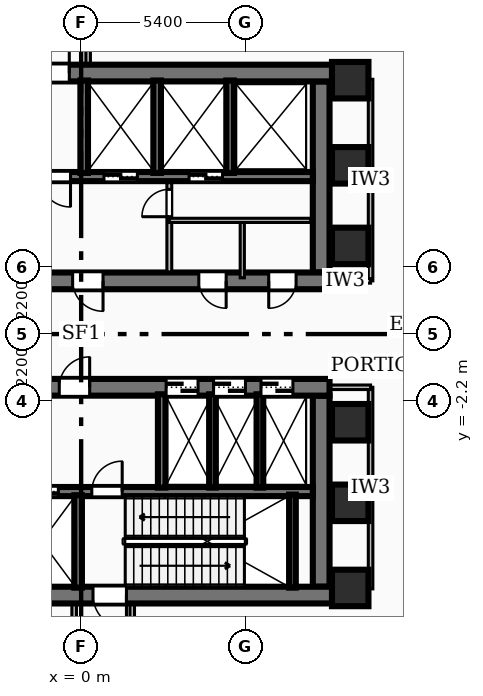
"""IFC4 building model, lengths in metres.
Left out: names, types, materials, properties, quantities, classifications, styles, units other than length and angle.
Written with IfcOpenShell. Run it as: python <this file> out.ifc"""

import sys

from ifc_helpers import new_model, si_unit, direction, frame, frame_2d, origin, origin_2d, place, context, subcontext, project, spatial, rectangle, extrude, element, fill, save


model = new_model("IFC4")
c1 = context("Model", 3, precision=1e-05, world=origin(), true_north=direction((0.0, 1.0)))
c2 = subcontext(c1, "Body", "Model", "MODEL_VIEW")
j1 = project(units=[si_unit("LENGTHUNIT", "METRE"), si_unit("PLANEANGLEUNIT", "RADIAN")], contexts=[c1])
p1 = place(None, origin())
s1 = spatial("IfcSite", under=j1, at=p1, CompositionType="ELEMENT")
p2 = place(p1, origin())
s2 = spatial("IfcBuilding", under=s1, at=p2, CompositionType="ELEMENT")
p3 = place(p2, origin())
s3 = spatial("IfcBuildingStorey", under=s2, at=p3, CompositionType="ELEMENT", Elevation=0.0)
p4 = place(p3, frame((-8.78, 8.585, 0.0), z_axis=(0.0, 0.0, 1.0), x_axis=(1.0, 0.0, 0.0)))
e1 = element("IfcWall", 1, at=p4, inside=s3, PredefinedType="SHEAR", context=c2, shape_type="SweptSolid", body=[
    extrude(rectangle(XDim=17.56, YDim=0.55, at=frame_2d((8.78, 0.0))), origin(), (0.0, 0.0, 1.0), 5.08),
])
p5 = place(p4, frame((7.29, 0.0, 0.0)))
e2 = element("IfcOpeningElement", 2, at=p5, cuts=e1, PredefinedType="OPENING", context=c2, shape_type="SweptSolid", body=[
    extrude(rectangle(XDim=1.1, YDim=2.15, at=frame_2d((0.55, 1.075))), frame((0.0, 0.285, 0.0), z_axis=(0.0, -1.0, 0.0), x_axis=(1.0, 0.0, 0.0)), (0.0, 0.0, 1.0), 0.57),
])
p6 = place(p3, frame((8.17, 1.75, 0.0), z_axis=(0.0, 0.0, 1.0), x_axis=(-1.0, 0.0, 0.0)))
e3 = element("IfcWall", 3, at=p6, inside=s3, PredefinedType="SHEAR", context=c2, shape_type="SweptSolid", body=[
    extrude(rectangle(XDim=16.34, YDim=0.55, at=frame_2d((8.17, 0.0))), origin(), (0.0, 0.0, 1.0), 5.08),
])
p7 = place(p6, frame((7.45, 0.0, 0.0)))
e4 = element("IfcOpeningElement", 4, at=p7, cuts=e3, PredefinedType="OPENING", context=c2, shape_type="SweptSolid", body=[
    extrude(rectangle(XDim=1.0, YDim=2.1, at=frame_2d((0.5, 1.05))), frame((0.0, 0.285, 0.0), z_axis=(0.0, -1.0, 0.0), x_axis=(1.0, 0.0, 0.0)), (0.0, 0.0, 1.0), 0.57),
])
p8 = place(p6, frame((14.285, 0.0, 0.0)))
e5 = element("IfcOpeningElement", 5, at=p8, cuts=e3, PredefinedType="OPENING", context=c2, shape_type="SweptSolid", body=[
    extrude(rectangle(XDim=1.05, YDim=2.15, at=frame_2d((0.525, 1.075))), frame((0.0, 0.285, 0.0), z_axis=(0.0, -1.0, 0.0), x_axis=(1.0, 0.0, 0.0)), (0.0, 0.0, 1.0), 0.57),
])
p9 = place(p6, frame((12.725, 0.0, 0.0)))
e6 = element("IfcOpeningElement", 6, at=p9, cuts=e3, PredefinedType="OPENING", context=c2, shape_type="SweptSolid", body=[
    extrude(rectangle(XDim=1.05, YDim=2.15, at=frame_2d((0.525, 1.075))), frame((0.0, 0.285, 0.0), z_axis=(0.0, -1.0, 0.0), x_axis=(1.0, 0.0, 0.0)), (0.0, 0.0, 1.0), 0.57),
])
p10 = place(p6, frame((11.165, 0.0, 0.0)))
e7 = element("IfcOpeningElement", 7, at=p10, cuts=e3, PredefinedType="OPENING", context=c2, shape_type="SweptSolid", body=[
    extrude(rectangle(XDim=1.05, YDim=2.15, at=frame_2d((0.525, 1.075))), frame((0.0, 0.285, 0.0), z_axis=(0.0, -1.0, 0.0), x_axis=(1.0, 0.0, 0.0)), (0.0, 0.0, 1.0), 0.57),
])
p11 = place(p6, frame((3.4, 0.0, 0.0)))
e8 = element("IfcOpeningElement", 8, at=p11, cuts=e3, PredefinedType="OPENING", context=c2, shape_type="SweptSolid", body=[
    extrude(rectangle(XDim=0.9, YDim=2.06, at=frame_2d((0.45, 1.03))), frame((0.0, 0.285, 0.0), z_axis=(0.0, -1.0, 0.0), x_axis=(1.0, 0.0, 0.0)), (0.0, 0.0, 1.0), 0.57),
])
p12 = place(p6, frame((1.1, 0.0, 0.0)))
e9 = element("IfcOpeningElement", 9, at=p12, cuts=e3, PredefinedType="OPENING", context=c2, shape_type="SweptSolid", body=[
    extrude(rectangle(XDim=0.9, YDim=2.06, at=frame_2d((0.45, 1.03))), frame((0.0, 0.285, 0.0), z_axis=(0.0, -1.0, 0.0), x_axis=(1.0, 0.0, 0.0)), (0.0, 0.0, 1.0), 0.57),
])
p13 = place(p3, frame((7.895, 8.31, 0.0), z_axis=(0.0, 0.0, 1.0), x_axis=(0.0, -1.0, 0.0)))
e10 = element("IfcWall", 10, at=p13, inside=s3, PredefinedType="SHEAR", context=c2, shape_type="SweptSolid", body=[
    extrude(rectangle(XDim=6.285, YDim=0.55, at=frame_2d((3.143, 0.0))), origin(), (0.0, 0.0, 1.0), 5.08),
])
p14 = place(p3, frame((7.62, 5.18, 0.0), z_axis=(0.0, 0.0, 1.0), x_axis=(-1.0, 0.0, 0.0)))
e11 = element("IfcWall", 11, at=p14, inside=s3, PredefinedType="SOLIDWALL", context=c2, shape_type="SweptSolid", body=[
    extrude(rectangle(XDim=15.24, YDim=0.3, at=frame_2d((7.62, 0.0))), origin(), (0.0, 0.0, 1.0), 5.08),
])
p15 = place(p14, frame((5.77, 0.0, 0.0)))
e12 = element("IfcOpeningElement", 12, at=p15, cuts=e11, PredefinedType="OPENING", context=c2, shape_type="SweptSolid", body=[
    extrude(rectangle(XDim=1.1, YDim=2.15, at=frame_2d((0.55, 1.075))), frame((0.0, 0.16, 0.0), z_axis=(0.0, -1.0, 0.0), x_axis=(1.0, 0.0, 0.0)), (0.0, 0.0, 1.0), 0.32),
])
p16 = place(p14, frame((2.97, 0.0, 0.0)))
e13 = element("IfcOpeningElement", 13, at=p16, cuts=e11, PredefinedType="OPENING", context=c2, shape_type="SweptSolid", body=[
    extrude(rectangle(XDim=1.1, YDim=2.15, at=frame_2d((0.55, 1.075))), frame((0.0, 0.16, 0.0), z_axis=(0.0, -1.0, 0.0), x_axis=(1.0, 0.0, 0.0)), (0.0, 0.0, 1.0), 0.32),
])
p17 = place(p14, frame((7.97, 0.0, 0.0)))
e14 = element("IfcOpeningElement", 14, at=p17, cuts=e11, PredefinedType="OPENING", context=c2, shape_type="SweptSolid", body=[
    extrude(rectangle(XDim=1.0, YDim=2.1, at=frame_2d((0.5, 1.05))), frame((0.0, 0.16, 0.0), z_axis=(0.0, -1.0, 0.0), x_axis=(1.0, 0.0, 0.0)), (0.0, 0.0, 1.0), 0.32),
])
p18 = place(p3, frame((8.78, -8.585, 0.0), z_axis=(0.0, 0.0, 1.0), x_axis=(-1.0, 0.0, 0.0)))
e15 = element("IfcWall", 15, at=p18, inside=s3, PredefinedType="SHEAR", context=c2, shape_type="SweptSolid", body=[
    extrude(rectangle(XDim=17.56, YDim=0.55, at=frame_2d((8.78, 0.0))), origin(), (0.0, 0.0, 1.0), 5.08),
])
p19 = place(p18, frame((7.29, 0.0, 0.0)))
e16 = element("IfcOpeningElement", 16, at=p19, cuts=e15, PredefinedType="OPENING", context=c2, shape_type="SweptSolid", body=[
    extrude(rectangle(XDim=1.1, YDim=2.15, at=frame_2d((0.55, 1.075))), frame((0.0, 0.285, 0.0), z_axis=(0.0, -1.0, 0.0), x_axis=(1.0, 0.0, 0.0)), (0.0, 0.0, 1.0), 0.57),
])
p20 = place(p3, frame((-8.17, -1.75, 0.0), z_axis=(0.0, 0.0, 1.0), x_axis=(1.0, 0.0, 0.0)))
e17 = element("IfcWall", 17, at=p20, inside=s3, PredefinedType="SHEAR", context=c2, shape_type="SweptSolid", body=[
    extrude(rectangle(XDim=16.34, YDim=0.55, at=frame_2d((8.17, 0.0))), origin(), (0.0, 0.0, 1.0), 5.08),
])
p21 = place(p20, frame((7.45, 0.0, 0.0)))
e18 = element("IfcOpeningElement", 18, at=p21, cuts=e17, PredefinedType="OPENING", context=c2, shape_type="SweptSolid", body=[
    extrude(rectangle(XDim=1.0, YDim=2.1, at=frame_2d((0.5, 1.05))), frame((0.0, 0.285, 0.0), z_axis=(0.0, -1.0, 0.0), x_axis=(1.0, 0.0, 0.0)), (0.0, 0.0, 1.0), 0.57),
])
p22 = place(p20, frame((10.965, 0.0, 0.0)))
e19 = element("IfcOpeningElement", 19, at=p22, cuts=e17, PredefinedType="OPENING", context=c2, shape_type="SweptSolid", body=[
    extrude(rectangle(XDim=1.05, YDim=2.15, at=frame_2d((0.525, 1.075))), frame((0.0, 0.285, 0.0), z_axis=(0.0, -1.0, 0.0), x_axis=(1.0, 0.0, 0.0)), (0.0, 0.0, 1.0), 0.57),
])
p23 = place(p20, frame((12.525, 0.0, 0.0)))
e20 = element("IfcOpeningElement", 20, at=p23, cuts=e17, PredefinedType="OPENING", context=c2, shape_type="SweptSolid", body=[
    extrude(rectangle(XDim=1.05, YDim=2.15, at=frame_2d((0.525, 1.075))), frame((0.0, 0.285, 0.0), z_axis=(0.0, -1.0, 0.0), x_axis=(1.0, 0.0, 0.0)), (0.0, 0.0, 1.0), 0.57),
])
p24 = place(p20, frame((14.085, 0.0, 0.0)))
e21 = element("IfcOpeningElement", 21, at=p24, cuts=e17, PredefinedType="OPENING", context=c2, shape_type="SweptSolid", body=[
    extrude(rectangle(XDim=1.05, YDim=2.15, at=frame_2d((0.525, 1.075))), frame((0.0, 0.285, 0.0), z_axis=(0.0, -1.0, 0.0), x_axis=(1.0, 0.0, 0.0)), (0.0, 0.0, 1.0), 0.57),
])
p25 = place(p20, frame((0.565, 0.0, 0.0)))
e22 = element("IfcOpeningElement", 22, at=p25, cuts=e17, PredefinedType="OPENING", context=c2, shape_type="SweptSolid", body=[
    extrude(rectangle(XDim=1.05, YDim=2.15, at=frame_2d((0.525, 1.075))), frame((0.0, 0.285, 0.0), z_axis=(0.0, -1.0, 0.0), x_axis=(1.0, 0.0, 0.0)), (0.0, 0.0, 1.0), 0.57),
])
p26 = place(p20, frame((2.125, 0.0, 0.0)))
e23 = element("IfcOpeningElement", 23, at=p26, cuts=e17, PredefinedType="OPENING", context=c2, shape_type="SweptSolid", body=[
    extrude(rectangle(XDim=1.05, YDim=2.15, at=frame_2d((0.525, 1.075))), frame((0.0, 0.285, 0.0), z_axis=(0.0, -1.0, 0.0), x_axis=(1.0, 0.0, 0.0)), (0.0, 0.0, 1.0), 0.57),
])
p27 = place(p20, frame((3.685, 0.0, 0.0)))
e24 = element("IfcOpeningElement", 24, at=p27, cuts=e17, PredefinedType="OPENING", context=c2, shape_type="SweptSolid", body=[
    extrude(rectangle(XDim=1.05, YDim=2.15, at=frame_2d((0.525, 1.075))), frame((0.0, 0.285, 0.0), z_axis=(0.0, -1.0, 0.0), x_axis=(1.0, 0.0, 0.0)), (0.0, 0.0, 1.0), 0.57),
])
p28 = place(p3, frame((7.895, -2.025, 0.0), z_axis=(0.0, 0.0, 1.0), x_axis=(0.0, -1.0, 0.0)))
e25 = element("IfcWall", 25, at=p28, inside=s3, PredefinedType="SHEAR", context=c2, shape_type="SweptSolid", body=[
    extrude(rectangle(XDim=6.285, YDim=0.55, at=frame_2d((3.143, 0.0))), origin(), (0.0, 0.0, 1.0), 5.08),
])
p29 = place(p3, frame((-7.62, -5.18, 0.0), z_axis=(0.0, 0.0, 1.0), x_axis=(1.0, 0.0, 0.0)))
e26 = element("IfcWall", 26, at=p29, inside=s3, PredefinedType="SOLIDWALL", context=c2, shape_type="SweptSolid", body=[
    extrude(rectangle(XDim=15.24, YDim=0.3, at=frame_2d((7.62, 0.0))), origin(), (0.0, 0.0, 1.0), 5.08),
])
p30 = place(p29, frame((5.77, 0.0, 0.0)))
e27 = element("IfcOpeningElement", 27, at=p30, cuts=e26, PredefinedType="OPENING", context=c2, shape_type="SweptSolid", body=[
    extrude(rectangle(XDim=1.1, YDim=2.15, at=frame_2d((0.55, 1.075))), frame((0.0, 0.16, 0.0), z_axis=(0.0, -1.0, 0.0), x_axis=(1.0, 0.0, 0.0)), (0.0, 0.0, 1.0), 0.32),
])
p31 = place(p29, frame((7.97, 0.0, 0.0)))
e28 = element("IfcOpeningElement", 28, at=p31, cuts=e26, PredefinedType="OPENING", context=c2, shape_type="SweptSolid", body=[
    extrude(rectangle(XDim=1.0, YDim=2.1, at=frame_2d((0.5, 1.05))), frame((0.0, 0.16, 0.0), z_axis=(0.0, -1.0, 0.0), x_axis=(1.0, 0.0, 0.0)), (0.0, 0.0, 1.0), 0.32),
])
p32 = place(p3, frame((6.95, -8.34, 0.0), z_axis=(0.0, 0.0, 1.0), x_axis=(0.0, 1.0, 0.0)))
e29 = element("IfcWall", 29, at=p32, inside=s3, PredefinedType="SOLIDWALL", context=c2, shape_type="SweptSolid", body=[
    extrude(rectangle(XDim=3.06, YDim=0.22, at=frame_2d((1.53, 0.0))), origin(), (0.0, 0.0, 1.0), 5.08),
])
for number, where, z_axis, x_axis in (
    (30, (0.1, 5.3, 0.0), (0.0, 0.0, 1.0), (0.0, 1.0, 0.0)),
    (31, (2.5, 5.3, 0.0), (0.0, 0.0, 1.0), (0.0, 1.0, 0.0)),
    (32, (4.9, 5.3, 0.0), (0.0, 0.0, 1.0), (0.0, 1.0, 0.0)),
    (33, (-0.1, -8.34, 0.0), (0.0, 0.0, 1.0), (0.0, 1.0, 0.0)),
):
    element("IfcWall", number, at=place(p3, frame(where, z_axis=z_axis, x_axis=x_axis)), inside=s3, PredefinedType="SOLIDWALL", context=c2, shape_type="SweptSolid", body=[
        extrude(rectangle(XDim=3.04, YDim=0.25, at=frame_2d((1.52, 0.0))), origin(), (0.0, 0.0, 1.0), 5.08),
    ])
p33 = place(p3, frame((2.65, -5.05, 0.0), z_axis=(0.0, 0.0, 1.0), x_axis=(0.0, 1.0, 0.0)))
e34 = element("IfcWall", 34, at=p33, inside=s3, PredefinedType="SOLIDWALL", context=c2, shape_type="SweptSolid", body=[
    extrude(rectangle(XDim=3.07, YDim=0.25, at=frame_2d((1.535, 0.0))), origin(), (0.0, 0.0, 1.0), 5.08),
])
for number, where, z_axis, x_axis in (
    (35, (4.32, -5.05, 0.0), (0.0, 0.0, 1.0), (0.0, 1.0, 0.0)),
    (36, (5.88, -5.05, 0.0), (0.0, 0.0, 1.0), (0.0, 1.0, 0.0)),
):
    element("IfcWall", number, at=place(p3, frame(where, z_axis=z_axis, x_axis=x_axis)), inside=s3, PredefinedType="SOLIDWALL", context=c2, shape_type="SweptSolid", body=[
        extrude(rectangle(XDim=3.07, YDim=0.22, at=frame_2d((1.535, 0.0))), origin(), (0.0, 0.0, 1.0), 5.08),
    ])
for number, where, z_axis, x_axis in (
    (37, (8.85, -5.55, 0.0), (0.0, 0.0, 1.0), (1.0, 0.0, 0.0)),
    (38, (8.85, -2.9, 0.0), (0.0, 0.0, 1.0), (1.0, 0.0, 0.0)),
    (39, (8.85, 2.9, 0.0), (0.0, 0.0, 1.0), (1.0, 0.0, 0.0)),
    (40, (8.85, 5.55, 0.0), (0.0, 0.0, 1.0), (1.0, 0.0, 0.0)),
    (41, (8.85, -8.35, 0.0), (0.0, 0.0, 1.0), (1.0, 0.0, 0.0)),
    (42, (8.85, 8.35, 0.0), (0.0, 0.0, 1.0), (1.0, 0.0, 0.0)),
):
    element("IfcColumn", number, at=place(p3, frame(where, z_axis=z_axis, x_axis=x_axis)), inside=s3, PredefinedType="COLUMN", context=c2, shape_type="SweptSolid", body=[
        extrude(rectangle(XDim=1.2, YDim=1.2, at=origin_2d()), origin(), (0.0, 0.0, 1.0), 5.4),
    ])
p34 = place(p3, frame((2.9, 2.04, 0.0), z_axis=(0.0, 0.0, 1.0), x_axis=(0.0, 1.0, 0.0)))
e43 = element("IfcWall", 43, at=p34, inside=s3, PredefinedType="PARTITIONING", context=c2, shape_type="SweptSolid", body=[
    extrude(rectangle(XDim=2.94, YDim=0.16, at=frame_2d((1.47, 0.0))), origin(), (0.0, 0.0, 1.0), 4.145),
])
p35 = place(p34, frame((1.82, 0.0, 0.0)))
e44 = element("IfcOpeningElement", 44, at=p35, cuts=e43, PredefinedType="OPENING", context=c2, shape_type="SweptSolid", body=[
    extrude(rectangle(XDim=0.9, YDim=2.06, at=frame_2d((0.45, 1.03))), frame((0.0, 0.09, 0.0), z_axis=(0.0, -1.0, 0.0), x_axis=(1.0, 0.0, 0.0)), (0.0, 0.0, 1.0), 0.18),
])
p36 = place(p3, frame((2.9, 3.74, 0.0), z_axis=(0.0, 0.0, 1.0), x_axis=(1.0, 0.0, 0.0)))
e45 = element("IfcWall", 45, at=p36, inside=s3, PredefinedType="PARTITIONING", context=c2, shape_type="SweptSolid", body=[
    extrude(rectangle(XDim=4.65, YDim=0.138, at=frame_2d((2.325, 0.0))), origin(), (0.0, 0.0, 1.0), 5.08),
])
p37 = place(p3, frame((5.3, 1.85, 0.0), z_axis=(0.0, 0.0, 1.0), x_axis=(0.0, 1.0, 0.0)))
e46 = element("IfcWall", 46, at=p37, inside=s3, PredefinedType="PARTITIONING", context=c2, shape_type="SweptSolid", body=[
    extrude(rectangle(XDim=1.89, YDim=0.138, at=frame_2d((0.945, 0.0))), origin(), (0.0, 0.0, 1.0), 4.145),
])
p38 = place(p3, frame((9.52, 1.75, 0.0), z_axis=(0.0, 0.0, 1.0), x_axis=(0.0, 1.0, 0.0)))
e47 = element("IfcWall", 47, at=p38, inside=s3, PredefinedType="PARTITIONING", context=c2, shape_type="SweptSolid", body=[
    extrude(rectangle(XDim=6.63, YDim=0.15, at=frame_2d((3.315, 0.0))), origin(), (0.0, 0.0, 1.0), 4.09),
])
p39 = place(p3, frame((7.85, 1.75, 0.0), z_axis=(0.0, 0.0, 1.0), x_axis=(1.0, 0.0, 0.0)))
e48 = element("IfcWall", 48, at=p39, inside=s3, PredefinedType="PARTITIONING", context=c2, shape_type="SweptSolid", body=[
    extrude(rectangle(XDim=1.67, YDim=0.15, at=frame_2d((0.835, 0.0))), origin(), (0.0, 0.0, 1.0), 4.145),
])
p40 = place(p3, frame((9.52, -8.38, 0.0), z_axis=(0.0, 0.0, 1.0), x_axis=(0.0, 1.0, 0.0)))
e49 = element("IfcWall", 49, at=p40, inside=s3, PredefinedType="PARTITIONING", context=c2, shape_type="SweptSolid", body=[
    extrude(rectangle(XDim=6.63, YDim=0.15, at=frame_2d((3.315, 0.0))), origin(), (0.0, 0.0, 1.0), 4.09),
])
p41 = place(p3, frame((7.85, -1.75, 0.0), z_axis=(0.0, 0.0, 1.0), x_axis=(1.0, 0.0, 0.0)))
e50 = element("IfcWall", 50, at=p41, inside=s3, PredefinedType="PARTITIONING", context=c2, shape_type="SweptSolid", body=[
    extrude(rectangle(XDim=1.67, YDim=0.15, at=frame_2d((0.835, 0.0))), origin(), (0.0, 0.0, 1.0), 4.145),
])
p42 = place(p3, frame((0.23, 8.7, 0.0), z_axis=(0.0, 0.0, 1.0), x_axis=(0.0, 1.0, 0.0)))
e51 = element("IfcWall", 51, at=p42, inside=s3, PredefinedType="PARTITIONING", context=c2, shape_type="SweptSolid", body=[
    extrude(rectangle(XDim=18.7, YDim=0.15, at=frame_2d((9.35, 0.0))), origin(), (0.0, 0.0, 1.0), 4.09),
])
for number, where, z_axis, x_axis in (
    (52, (-0.23, -25.15, 0.0), (0.0, 0.0, 1.0), (0.0, 1.0, 0.0)),
    (53, (1.68, -25.15, 0.0), (0.0, 0.0, 1.0), (0.0, 1.0, 0.0)),
):
    element("IfcWall", number, at=place(p3, frame(where, z_axis=z_axis, x_axis=x_axis)), inside=s3, PredefinedType="PARTITIONING", context=c2, shape_type="SweptSolid", body=[
        extrude(rectangle(XDim=16.45, YDim=0.15, at=frame_2d((8.225, 0.0))), origin(), (0.0, 0.0, 1.0), 5.08),
    ])
p43 = place(p7, origin())
e54 = element("IfcDoor", 54, at=p43, inside=s3, OperationType="SINGLE_SWING_LEFT", PredefinedType="DOOR", context=c2, shape_type="SweptSolid", body=[
    extrude(rectangle(XDim=1.0, YDim=2.1, at=frame_2d((0.5, 1.05))), frame((0.0, 0.025, 0.0), z_axis=(0.0, -1.0, 0.0), x_axis=(1.0, 0.0, 0.0)), (0.0, 0.0, 1.0), 0.05),
])
fill(e4, e54)
p44 = place(p21, origin())
e55 = element("IfcDoor", 55, at=p44, inside=s3, OperationType="SINGLE_SWING_RIGHT", PredefinedType="DOOR", context=c2, shape_type="SweptSolid", body=[
    extrude(rectangle(XDim=1.0, YDim=2.1, at=frame_2d((0.5, 1.05))), frame((0.0, 0.025, 0.0), z_axis=(0.0, -1.0, 0.0), x_axis=(1.0, 0.0, 0.0)), (0.0, 0.0, 1.0), 0.05),
])
fill(e18, e55)
p45 = place(p15, origin())
e56 = element("IfcDoor", 56, at=p45, inside=s3, OperationType="DOUBLE_DOOR_SLIDING", PredefinedType="DOOR", context=c2, shape_type="SweptSolid", body=[
    extrude(rectangle(XDim=1.1, YDim=2.15, at=frame_2d((0.55, 1.075))), frame((0.0, 0.025, 0.0), z_axis=(0.0, -1.0, 0.0), x_axis=(1.0, 0.0, 0.0)), (0.0, 0.0, 1.0), 0.05),
])
fill(e12, e56)
p46 = place(p16, origin())
e57 = element("IfcDoor", 57, at=p46, inside=s3, OperationType="DOUBLE_DOOR_SLIDING", PredefinedType="DOOR", context=c2, shape_type="SweptSolid", body=[
    extrude(rectangle(XDim=1.1, YDim=2.15, at=frame_2d((0.55, 1.075))), frame((0.0, 0.025, 0.0), z_axis=(0.0, -1.0, 0.0), x_axis=(1.0, 0.0, 0.0)), (0.0, 0.0, 1.0), 0.05),
])
fill(e13, e57)
p47 = place(p17, origin())
e58 = element("IfcDoor", 58, at=p47, inside=s3, OperationType="SINGLE_SWING_LEFT", PredefinedType="DOOR", context=c2, shape_type="SweptSolid", body=[
    extrude(rectangle(XDim=1.0, YDim=2.1, at=frame_2d((0.5, 1.05))), frame((0.0, 0.025, 0.0), z_axis=(0.0, -1.0, 0.0), x_axis=(1.0, 0.0, 0.0)), (0.0, 0.0, 1.0), 0.05),
])
fill(e14, e58)
p48 = place(p30, origin())
e59 = element("IfcDoor", 59, at=p48, inside=s3, OperationType="DOUBLE_DOOR_SLIDING", PredefinedType="DOOR", context=c2, shape_type="SweptSolid", body=[
    extrude(rectangle(XDim=1.1, YDim=2.15, at=frame_2d((0.55, 1.075))), frame((0.0, 0.025, 0.0), z_axis=(0.0, -1.0, 0.0), x_axis=(1.0, 0.0, 0.0)), (0.0, 0.0, 1.0), 0.05),
])
fill(e27, e59)
p49 = place(p31, origin())
e60 = element("IfcDoor", 60, at=p49, inside=s3, OperationType="SINGLE_SWING_RIGHT", PredefinedType="DOOR", context=c2, shape_type="SweptSolid", body=[
    extrude(rectangle(XDim=1.0, YDim=2.1, at=frame_2d((0.5, 1.05))), frame((0.0, 0.025, 0.0), z_axis=(0.0, -1.0, 0.0), x_axis=(1.0, 0.0, 0.0)), (0.0, 0.0, 1.0), 0.05),
])
fill(e28, e60)
p50 = place(p5, origin())
e61 = element("IfcDoor", 61, at=p50, inside=s3, OperationType="SINGLE_SWING_RIGHT", PredefinedType="DOOR", context=c2, shape_type="SweptSolid", body=[
    extrude(rectangle(XDim=1.1, YDim=2.15, at=frame_2d((0.55, 1.075))), frame((0.0, 0.025, 0.0), z_axis=(0.0, -1.0, 0.0), x_axis=(1.0, 0.0, 0.0)), (0.0, 0.0, 1.0), 0.05),
])
fill(e2, e61)
p51 = place(p19, origin())
e62 = element("IfcDoor", 62, at=p51, inside=s3, OperationType="SINGLE_SWING_LEFT", PredefinedType="DOOR", context=c2, shape_type="SweptSolid", body=[
    extrude(rectangle(XDim=1.1, YDim=2.15, at=frame_2d((0.55, 1.075))), frame((0.0, 0.025, 0.0), z_axis=(0.0, -1.0, 0.0), x_axis=(1.0, 0.0, 0.0)), (0.0, 0.0, 1.0), 0.05),
])
fill(e16, e62)
p52 = place(p22, origin())
e63 = element("IfcDoor", 63, at=p52, inside=s3, OperationType="DOUBLE_DOOR_SLIDING", PredefinedType="DOOR", context=c2, shape_type="SweptSolid", body=[
    extrude(rectangle(XDim=1.05, YDim=2.15, at=frame_2d((0.525, 1.075))), frame((0.0, 0.025, 0.0), z_axis=(0.0, -1.0, 0.0), x_axis=(1.0, 0.0, 0.0)), (0.0, 0.0, 1.0), 0.05),
])
fill(e19, e63)
p53 = place(p23, origin())
e64 = element("IfcDoor", 64, at=p53, inside=s3, OperationType="DOUBLE_DOOR_SLIDING", PredefinedType="DOOR", context=c2, shape_type="SweptSolid", body=[
    extrude(rectangle(XDim=1.05, YDim=2.15, at=frame_2d((0.525, 1.075))), frame((0.0, 0.025, 0.0), z_axis=(0.0, -1.0, 0.0), x_axis=(1.0, 0.0, 0.0)), (0.0, 0.0, 1.0), 0.05),
])
fill(e20, e64)
p54 = place(p24, origin())
e65 = element("IfcDoor", 65, at=p54, inside=s3, OperationType="DOUBLE_DOOR_SLIDING", PredefinedType="DOOR", context=c2, shape_type="SweptSolid", body=[
    extrude(rectangle(XDim=1.05, YDim=2.15, at=frame_2d((0.525, 1.075))), frame((0.0, 0.025, 0.0), z_axis=(0.0, -1.0, 0.0), x_axis=(1.0, 0.0, 0.0)), (0.0, 0.0, 1.0), 0.05),
])
fill(e21, e65)
p55 = place(p11, origin())
e66 = element("IfcDoor", 66, at=p55, inside=s3, OperationType="SINGLE_SWING_LEFT", PredefinedType="DOOR", context=c2, shape_type="SweptSolid", body=[
    extrude(rectangle(XDim=0.9, YDim=2.06, at=frame_2d((0.45, 1.03))), frame((0.0, 0.025, 0.0), z_axis=(0.0, -1.0, 0.0), x_axis=(1.0, 0.0, 0.0)), (0.0, 0.0, 1.0), 0.05),
])
fill(e8, e66)
p56 = place(p12, origin())
e67 = element("IfcDoor", 67, at=p56, inside=s3, OperationType="SINGLE_SWING_RIGHT", PredefinedType="DOOR", context=c2, shape_type="SweptSolid", body=[
    extrude(rectangle(XDim=0.9, YDim=2.06, at=frame_2d((0.45, 1.03))), frame((0.0, 0.025, 0.0), z_axis=(0.0, -1.0, 0.0), x_axis=(1.0, 0.0, 0.0)), (0.0, 0.0, 1.0), 0.05),
])
fill(e9, e67)
p57 = place(p35, origin())
e68 = element("IfcDoor", 68, at=p57, inside=s3, OperationType="SINGLE_SWING_LEFT", PredefinedType="DOOR", context=c2, shape_type="SweptSolid", body=[
    extrude(rectangle(XDim=0.9, YDim=2.06, at=frame_2d((0.45, 1.03))), frame((0.0, 0.025, 0.0), z_axis=(0.0, -1.0, 0.0), x_axis=(1.0, 0.0, 0.0)), (0.0, 0.0, 1.0), 0.05),
])
fill(e44, e68)
save(model, sys.argv[1])
